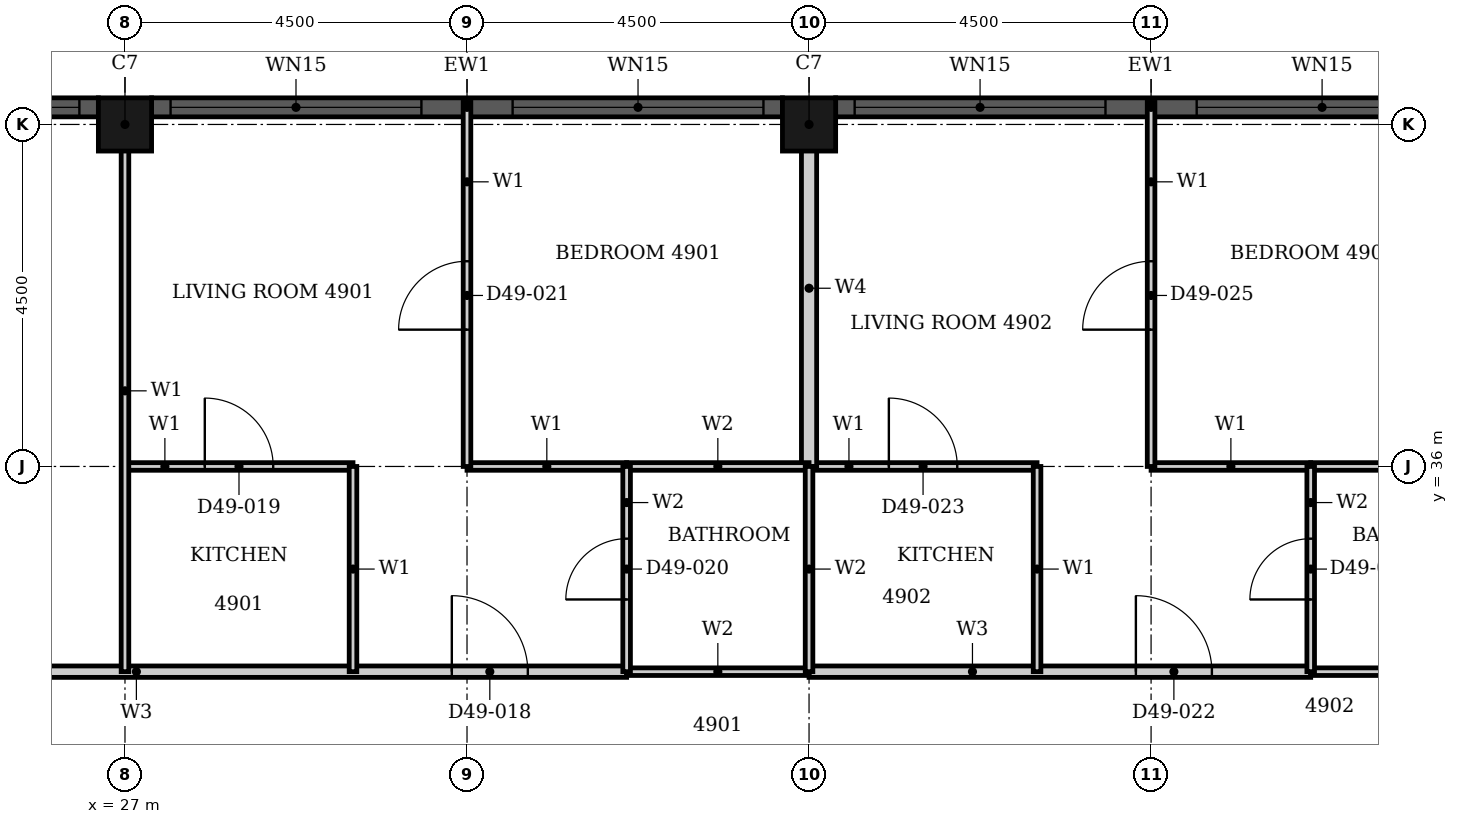
"""IFC4 building model, lengths in metres.
Left out: names, types, materials, properties, quantities, classifications, styles, units other than length and angle.
Written with IfcOpenShell. Run it as: python <this file> out.ifc"""

import sys

from ifc_helpers import new_model, si_unit, direction, frame, frame_2d, origin, origin_2d, place, context, subcontext, project, spatial, rectangle, hollow_rectangle, extrude, element, fill, save


model = new_model("IFC4")
c1 = context("Model", 3, precision=1e-05, world=origin(), true_north=direction((0.0, 1.0)))
c2 = subcontext(c1, "Body", "Model", "MODEL_VIEW")
j1 = project(units=[si_unit("LENGTHUNIT", "METRE"), si_unit("PLANEANGLEUNIT", "RADIAN")], contexts=[c1])
p1 = place(None, origin())
s1 = spatial("IfcSite", under=j1, at=p1, CompositionType="ELEMENT")
p2 = place(p1, origin())
s2 = spatial("IfcBuilding", under=s1, at=p2, CompositionType="ELEMENT")
p3 = place(p2, frame((0.0, 0.0, 196.1)))
s3 = spatial("IfcBuildingStorey", under=s2, at=p3, CompositionType="ELEMENT", Elevation=196.1)
for number, where, z_axis, x_axis in (
    (1, (36.0, 40.5, 0.0), (0.0, 0.0, 1.0), (1.0, 0.0, 0.0)),
    (2, (27.0, 40.5, 0.0), (0.0, 0.0, 1.0), (1.0, 0.0, 0.0)),
):
    element("IfcColumn", number, at=place(p3, frame(where, z_axis=z_axis, x_axis=x_axis)), inside=s3, PredefinedType="COLUMN", context=c2, shape_type="SweptSolid", body=[
        extrude(hollow_rectangle(XDim=0.7, YDim=0.7, WallThickness=0.022, at=origin_2d()), origin(), (0.0, 0.0, 1.0), 3.7),
    ])
p4 = place(p3, frame((44.65, 40.725, 0.0), z_axis=(0.0, 0.0, 1.0), x_axis=(-1.0, 0.0, 0.0)))
e3 = element("IfcWall", 3, at=p4, inside=s3, PredefinedType="SOLIDWALL", context=c2, shape_type="SweptSolid", body=[
    extrude(rectangle(XDim=8.3, YDim=0.25, at=frame_2d((4.15, 0.0))), origin(), (0.0, 0.0, 1.0), 3.7),
])
p5 = place(p4, frame((0.25, 0.0, 0.45)))
e4 = element("IfcOpeningElement", 4, at=p5, cuts=e3, PredefinedType="OPENING", context=c2, shape_type="SweptSolid", body=[
    extrude(rectangle(XDim=3.3, YDim=2.3, at=frame_2d((1.65, 1.15))), frame((0.0, 0.135, 0.0), z_axis=(0.0, -1.0, 0.0), x_axis=(1.0, 0.0, 0.0)), (0.0, 0.0, 1.0), 0.27),
])
p6 = place(p4, frame((4.75, 0.0, 0.45)))
e5 = element("IfcOpeningElement", 5, at=p6, cuts=e3, PredefinedType="OPENING", context=c2, shape_type="SweptSolid", body=[
    extrude(rectangle(XDim=3.3, YDim=2.3, at=frame_2d((1.65, 1.15))), frame((0.0, 0.135, 0.0), z_axis=(0.0, -1.0, 0.0), x_axis=(1.0, 0.0, 0.0)), (0.0, 0.0, 1.0), 0.27),
])
p7 = place(p3, frame((35.65, 40.725, 0.0), z_axis=(0.0, 0.0, 1.0), x_axis=(-1.0, 0.0, 0.0)))
e6 = element("IfcWall", 6, at=p7, inside=s3, PredefinedType="SOLIDWALL", context=c2, shape_type="SweptSolid", body=[
    extrude(rectangle(XDim=8.3, YDim=0.25, at=frame_2d((4.15, 0.0))), origin(), (0.0, 0.0, 1.0), 3.7),
])
p8 = place(p7, frame((0.25, 0.0, 0.45)))
e7 = element("IfcOpeningElement", 7, at=p8, cuts=e6, PredefinedType="OPENING", context=c2, shape_type="SweptSolid", body=[
    extrude(rectangle(XDim=3.3, YDim=2.3, at=frame_2d((1.65, 1.15))), frame((0.0, 0.135, 0.0), z_axis=(0.0, -1.0, 0.0), x_axis=(1.0, 0.0, 0.0)), (0.0, 0.0, 1.0), 0.27),
])
p9 = place(p7, frame((4.75, 0.0, 0.45)))
e8 = element("IfcOpeningElement", 8, at=p9, cuts=e6, PredefinedType="OPENING", context=c2, shape_type="SweptSolid", body=[
    extrude(rectangle(XDim=3.3, YDim=2.3, at=frame_2d((1.65, 1.15))), frame((0.0, 0.135, 0.0), z_axis=(0.0, -1.0, 0.0), x_axis=(1.0, 0.0, 0.0)), (0.0, 0.0, 1.0), 0.27),
])
p10 = place(p3, frame((26.65, 40.725, 0.0), z_axis=(0.0, 0.0, 1.0), x_axis=(-1.0, 0.0, 0.0)))
e9 = element("IfcWall", 9, at=p10, inside=s3, PredefinedType="SOLIDWALL", context=c2, shape_type="SweptSolid", body=[
    extrude(rectangle(XDim=8.3, YDim=0.25, at=frame_2d((4.15, 0.0))), origin(), (0.0, 0.0, 1.0), 3.7),
])
p11 = place(p10, frame((0.25, 0.0, 0.45)))
e10 = element("IfcOpeningElement", 10, at=p11, cuts=e9, PredefinedType="OPENING", context=c2, shape_type="SweptSolid", body=[
    extrude(rectangle(XDim=3.3, YDim=2.3, at=frame_2d((1.65, 1.15))), frame((0.0, 0.135, 0.0), z_axis=(0.0, -1.0, 0.0), x_axis=(1.0, 0.0, 0.0)), (0.0, 0.0, 1.0), 0.27),
])
p12 = place(p10, frame((4.75, 0.0, 0.45)))
e11 = element("IfcOpeningElement", 11, at=p12, cuts=e9, PredefinedType="OPENING", context=c2, shape_type="SweptSolid", body=[
    extrude(rectangle(XDim=3.3, YDim=2.3, at=frame_2d((1.65, 1.15))), frame((0.0, 0.135, 0.0), z_axis=(0.0, -1.0, 0.0), x_axis=(1.0, 0.0, 0.0)), (0.0, 0.0, 1.0), 0.27),
])
p13 = place(p3, frame((18.0, 33.3, 0.0), z_axis=(0.0, 0.0, 1.0), x_axis=(1.0, 0.0, 0.0)))
e12 = element("IfcWall", 12, at=p13, inside=s3, PredefinedType="PARTITIONING", context=c2, shape_type="SweptSolid", body=[
    extrude(rectangle(XDim=15.6, YDim=0.15, at=frame_2d((7.8, 0.0))), origin(), (0.0, 0.0, 1.0), 3.4),
])
p14 = place(p13, frame((4.0, 0.0, 0.0)))
e13 = element("IfcOpeningElement", 13, at=p14, cuts=e12, PredefinedType="OPENING", context=c2, shape_type="SweptSolid", body=[
    extrude(rectangle(XDim=1.0, YDim=2.1, at=frame_2d((0.5, 1.05))), frame((0.0, 0.085, 0.0), z_axis=(0.0, -1.0, 0.0), x_axis=(1.0, 0.0, 0.0)), (0.0, 0.0, 1.0), 0.17),
])
p15 = place(p13, frame((13.3, 0.0, 0.0)))
e14 = element("IfcOpeningElement", 14, at=p15, cuts=e12, PredefinedType="OPENING", context=c2, shape_type="SweptSolid", body=[
    extrude(rectangle(XDim=1.0, YDim=2.2, at=frame_2d((0.5, 1.1))), frame((0.0, 0.085, 0.0), z_axis=(0.0, -1.0, 0.0), x_axis=(1.0, 0.0, 0.0)), (0.0, 0.0, 1.0), 0.17),
])
p16 = place(p3, frame((36.0, 33.3, 0.0), z_axis=(0.0, 0.0, 1.0), x_axis=(1.0, 0.0, 0.0)))
e15 = element("IfcWall", 15, at=p16, inside=s3, PredefinedType="PARTITIONING", context=c2, shape_type="SweptSolid", body=[
    extrude(rectangle(XDim=6.6, YDim=0.15, at=frame_2d((3.3, 0.0))), origin(), (0.0, 0.0, 1.0), 3.4),
])
p17 = place(p16, frame((4.3, 0.0, 0.0)))
e16 = element("IfcOpeningElement", 16, at=p17, cuts=e15, PredefinedType="OPENING", context=c2, shape_type="SweptSolid", body=[
    extrude(rectangle(XDim=1.0, YDim=2.2, at=frame_2d((0.5, 1.1))), frame((0.0, 0.085, 0.0), z_axis=(0.0, -1.0, 0.0), x_axis=(1.0, 0.0, 0.0)), (0.0, 0.0, 1.0), 0.17),
])
p18 = place(p3, frame((31.5, 36.0, 0.0), z_axis=(0.0, 0.0, 1.0), x_axis=(1.0, 0.0, 0.0)))
e17 = element("IfcWall", 17, at=p18, inside=s3, PredefinedType="PARTITIONING", context=c2, shape_type="SweptSolid", body=[
    extrude(rectangle(XDim=2.1, YDim=0.1, at=frame_2d((1.05, 0.0))), origin(), (0.0, 0.0, 1.0), 3.4),
])
p19 = place(p3, frame((27.0, 36.0, 0.0), z_axis=(0.0, 0.0, 1.0), x_axis=(1.0, 0.0, 0.0)))
e18 = element("IfcWall", 18, at=p19, inside=s3, PredefinedType="PARTITIONING", context=c2, shape_type="SweptSolid", body=[
    extrude(rectangle(XDim=3.0, YDim=0.1, at=frame_2d((1.5, 0.0))), origin(), (0.0, 0.0, 1.0), 3.4),
])
p20 = place(p19, frame((1.05, 0.0, 0.0)))
e19 = element("IfcOpeningElement", 19, at=p20, cuts=e18, PredefinedType="OPENING", context=c2, shape_type="SweptSolid", body=[
    extrude(rectangle(XDim=0.9, YDim=2.1, at=frame_2d((0.45, 1.05))), frame((0.0, 0.06, 0.0), z_axis=(0.0, -1.0, 0.0), x_axis=(1.0, 0.0, 0.0)), (0.0, 0.0, 1.0), 0.12),
])
p21 = place(p3, frame((40.5, 36.0, 0.0), z_axis=(0.0, 0.0, 1.0), x_axis=(1.0, 0.0, 0.0)))
e20 = element("IfcWall", 20, at=p21, inside=s3, PredefinedType="PARTITIONING", context=c2, shape_type="SweptSolid", body=[
    extrude(rectangle(XDim=2.1, YDim=0.1, at=frame_2d((1.05, 0.0))), origin(), (0.0, 0.0, 1.0), 3.4),
])
p22 = place(p3, frame((36.0, 36.0, 0.0), z_axis=(0.0, 0.0, 1.0), x_axis=(1.0, 0.0, 0.0)))
e21 = element("IfcWall", 21, at=p22, inside=s3, PredefinedType="PARTITIONING", context=c2, shape_type="SweptSolid", body=[
    extrude(rectangle(XDim=3.0, YDim=0.1, at=frame_2d((1.5, 0.0))), origin(), (0.0, 0.0, 1.0), 3.4),
])
p23 = place(p22, frame((1.05, 0.0, 0.0)))
e22 = element("IfcOpeningElement", 22, at=p23, cuts=e21, PredefinedType="OPENING", context=c2, shape_type="SweptSolid", body=[
    extrude(rectangle(XDim=0.9, YDim=2.1, at=frame_2d((0.45, 1.05))), frame((0.0, 0.06, 0.0), z_axis=(0.0, -1.0, 0.0), x_axis=(1.0, 0.0, 0.0)), (0.0, 0.0, 1.0), 0.12),
])
p24 = place(p3, frame((27.0, 33.3, 0.0), z_axis=(0.0, 0.0, 1.0), x_axis=(0.0, 1.0, 0.0)))
e23 = element("IfcWall", 23, at=p24, inside=s3, PredefinedType="PARTITIONING", context=c2, shape_type="SweptSolid", body=[
    extrude(rectangle(XDim=7.39, YDim=0.1, at=frame_2d((3.695, 0.0))), origin(), (0.0, 0.0, 1.0), 3.4),
])
p25 = place(p3, frame((30.0, 33.3, 0.0), z_axis=(0.0, 0.0, 1.0), x_axis=(0.0, 1.0, 0.0)))
e24 = element("IfcWall", 24, at=p25, inside=s3, PredefinedType="PARTITIONING", context=c2, shape_type="SweptSolid", body=[
    extrude(rectangle(XDim=2.7, YDim=0.1, at=frame_2d((1.35, 0.0))), origin(), (0.0, 0.0, 1.0), 3.4),
])
p26 = place(p3, frame((31.5, 36.0, 0.0), z_axis=(0.0, 0.0, 1.0), x_axis=(0.0, 1.0, 0.0)))
e25 = element("IfcWall", 25, at=p26, inside=s3, PredefinedType="PARTITIONING", context=c2, shape_type="SweptSolid", body=[
    extrude(rectangle(XDim=4.79, YDim=0.1, at=frame_2d((2.395, 0.0))), origin(), (0.0, 0.0, 1.0), 3.4),
])
p27 = place(p26, frame((1.8, 0.0, 0.0)))
e26 = element("IfcOpeningElement", 26, at=p27, cuts=e25, PredefinedType="OPENING", context=c2, shape_type="SweptSolid", body=[
    extrude(rectangle(XDim=0.9, YDim=2.1, at=frame_2d((0.45, 1.05))), frame((0.0, 0.06, 0.0), z_axis=(0.0, -1.0, 0.0), x_axis=(1.0, 0.0, 0.0)), (0.0, 0.0, 1.0), 0.12),
])
p28 = place(p3, frame((39.0, 33.3, 0.0), z_axis=(0.0, 0.0, 1.0), x_axis=(0.0, 1.0, 0.0)))
e27 = element("IfcWall", 27, at=p28, inside=s3, PredefinedType="PARTITIONING", context=c2, shape_type="SweptSolid", body=[
    extrude(rectangle(XDim=2.7, YDim=0.1, at=frame_2d((1.35, 0.0))), origin(), (0.0, 0.0, 1.0), 3.4),
])
p29 = place(p3, frame((40.5, 36.0, 0.0), z_axis=(0.0, 0.0, 1.0), x_axis=(0.0, 1.0, 0.0)))
e28 = element("IfcWall", 28, at=p29, inside=s3, PredefinedType="PARTITIONING", context=c2, shape_type="SweptSolid", body=[
    extrude(rectangle(XDim=4.79, YDim=0.1, at=frame_2d((2.395, 0.0))), origin(), (0.0, 0.0, 1.0), 3.4),
])
p30 = place(p29, frame((1.8, 0.0, 0.0)))
e29 = element("IfcOpeningElement", 29, at=p30, cuts=e28, PredefinedType="OPENING", context=c2, shape_type="SweptSolid", body=[
    extrude(rectangle(XDim=0.9, YDim=2.1, at=frame_2d((0.45, 1.05))), frame((0.0, 0.06, 0.0), z_axis=(0.0, -1.0, 0.0), x_axis=(1.0, 0.0, 0.0)), (0.0, 0.0, 1.0), 0.12),
])
p31 = place(p3, frame((36.0, 36.0, 0.0), z_axis=(0.0, 0.0, 1.0), x_axis=(0.0, 1.0, 0.0)))
e30 = element("IfcWall", 30, at=p31, inside=s3, PredefinedType="PARTITIONING", context=c2, shape_type="SweptSolid", body=[
    extrude(rectangle(XDim=4.69, YDim=0.2, at=frame_2d((2.345, 0.0))), origin(), (0.0, 0.0, 1.0), 3.4),
])
for number, where, z_axis, x_axis in (
    (31, (33.6, 33.3, 0.0), (0.0, 0.0, 1.0), (1.0, 0.0, 0.0)),
    (32, (42.6, 33.3, 0.0), (0.0, 0.0, 1.0), (1.0, 0.0, 0.0)),
    (33, (33.6, 36.0, 0.0), (0.0, 0.0, 1.0), (1.0, 0.0, 0.0)),
    (34, (42.6, 36.0, 0.0), (0.0, 0.0, 1.0), (1.0, 0.0, 0.0)),
):
    element("IfcWall", number, at=place(p3, frame(where, z_axis=z_axis, x_axis=x_axis)), inside=s3, PredefinedType="PARTITIONING", context=c2, shape_type="SweptSolid", body=[
        extrude(rectangle(XDim=2.4, YDim=0.1, at=frame_2d((1.2, 0.0))), origin(), (0.0, 0.0, 1.0), 3.4),
    ])
p32 = place(p3, frame((33.6, 33.3, 0.0), z_axis=(0.0, 0.0, 1.0), x_axis=(0.0, 1.0, 0.0)))
e35 = element("IfcWall", 35, at=p32, inside=s3, PredefinedType="PARTITIONING", context=c2, shape_type="SweptSolid", body=[
    extrude(rectangle(XDim=2.7, YDim=0.1, at=frame_2d((1.35, 0.0))), origin(), (0.0, 0.0, 1.0), 3.4),
])
p33 = place(p32, frame((0.95, 0.0, 0.0)))
e36 = element("IfcOpeningElement", 36, at=p33, cuts=e35, PredefinedType="OPENING", context=c2, shape_type="SweptSolid", body=[
    extrude(rectangle(XDim=0.8, YDim=2.1, at=frame_2d((0.4, 1.05))), frame((0.0, 0.06, 0.0), z_axis=(0.0, -1.0, 0.0), x_axis=(1.0, 0.0, 0.0)), (0.0, 0.0, 1.0), 0.12),
])
p34 = place(p3, frame((36.0, 33.3, 0.0), z_axis=(0.0, 0.0, 1.0), x_axis=(0.0, 1.0, 0.0)))
e37 = element("IfcWall", 37, at=p34, inside=s3, PredefinedType="PARTITIONING", context=c2, shape_type="SweptSolid", body=[
    extrude(rectangle(XDim=2.7, YDim=0.1, at=frame_2d((1.35, 0.0))), origin(), (0.0, 0.0, 1.0), 3.4),
])
p35 = place(p3, frame((42.6, 33.3, 0.0), z_axis=(0.0, 0.0, 1.0), x_axis=(0.0, 1.0, 0.0)))
e38 = element("IfcWall", 38, at=p35, inside=s3, PredefinedType="PARTITIONING", context=c2, shape_type="SweptSolid", body=[
    extrude(rectangle(XDim=2.7, YDim=0.1, at=frame_2d((1.35, 0.0))), origin(), (0.0, 0.0, 1.0), 3.4),
])
p36 = place(p35, frame((0.95, 0.0, 0.0)))
e39 = element("IfcOpeningElement", 39, at=p36, cuts=e38, PredefinedType="OPENING", context=c2, shape_type="SweptSolid", body=[
    extrude(rectangle(XDim=0.8, YDim=2.1, at=frame_2d((0.4, 1.05))), frame((0.0, 0.06, 0.0), z_axis=(0.0, -1.0, 0.0), x_axis=(1.0, 0.0, 0.0)), (0.0, 0.0, 1.0), 0.12),
])
p37 = place(p5, origin())
e40 = element("IfcWindow", 40, at=p37, inside=s3, PartitioningType="SINGLE_PANEL", PredefinedType="WINDOW", context=c2, shape_type="SweptSolid", body=[
    extrude(rectangle(XDim=3.3, YDim=2.3, at=frame_2d((1.65, 1.15))), frame((0.0, 0.03, 0.0), z_axis=(0.0, -1.0, 0.0), x_axis=(1.0, 0.0, 0.0)), (0.0, 0.0, 1.0), 0.06),
])
fill(e4, e40)
p38 = place(p6, origin())
e41 = element("IfcWindow", 41, at=p38, inside=s3, PartitioningType="SINGLE_PANEL", PredefinedType="WINDOW", context=c2, shape_type="SweptSolid", body=[
    extrude(rectangle(XDim=3.3, YDim=2.3, at=frame_2d((1.65, 1.15))), frame((0.0, 0.03, 0.0), z_axis=(0.0, -1.0, 0.0), x_axis=(1.0, 0.0, 0.0)), (0.0, 0.0, 1.0), 0.06),
])
fill(e5, e41)
p39 = place(p8, origin())
e42 = element("IfcWindow", 42, at=p39, inside=s3, PartitioningType="SINGLE_PANEL", PredefinedType="WINDOW", context=c2, shape_type="SweptSolid", body=[
    extrude(rectangle(XDim=3.3, YDim=2.3, at=frame_2d((1.65, 1.15))), frame((0.0, 0.03, 0.0), z_axis=(0.0, -1.0, 0.0), x_axis=(1.0, 0.0, 0.0)), (0.0, 0.0, 1.0), 0.06),
])
fill(e7, e42)
p40 = place(p9, origin())
e43 = element("IfcWindow", 43, at=p40, inside=s3, PartitioningType="SINGLE_PANEL", PredefinedType="WINDOW", context=c2, shape_type="SweptSolid", body=[
    extrude(rectangle(XDim=3.3, YDim=2.3, at=frame_2d((1.65, 1.15))), frame((0.0, 0.03, 0.0), z_axis=(0.0, -1.0, 0.0), x_axis=(1.0, 0.0, 0.0)), (0.0, 0.0, 1.0), 0.06),
])
fill(e8, e43)
p41 = place(p11, origin())
e44 = element("IfcWindow", 44, at=p41, inside=s3, PartitioningType="SINGLE_PANEL", PredefinedType="WINDOW", context=c2, shape_type="SweptSolid", body=[
    extrude(rectangle(XDim=3.3, YDim=2.3, at=frame_2d((1.65, 1.15))), frame((0.0, 0.03, 0.0), z_axis=(0.0, -1.0, 0.0), x_axis=(1.0, 0.0, 0.0)), (0.0, 0.0, 1.0), 0.06),
])
fill(e10, e44)
p42 = place(p15, origin())
e45 = element("IfcDoor", 45, at=p42, inside=s3, OperationType="SINGLE_SWING_RIGHT", PredefinedType="DOOR", context=c2, shape_type="SweptSolid", body=[
    extrude(rectangle(XDim=1.0, YDim=2.2, at=frame_2d((0.5, 1.1))), frame((0.0, 0.025, 0.0), z_axis=(0.0, -1.0, 0.0), x_axis=(1.0, 0.0, 0.0)), (0.0, 0.0, 1.0), 0.05),
])
fill(e14, e45)
p43 = place(p20, origin())
e46 = element("IfcDoor", 46, at=p43, inside=s3, OperationType="SINGLE_SWING_LEFT", PredefinedType="DOOR", context=c2, shape_type="SweptSolid", body=[
    extrude(rectangle(XDim=0.9, YDim=2.1, at=frame_2d((0.45, 1.05))), frame((0.0, 0.025, 0.0), z_axis=(0.0, -1.0, 0.0), x_axis=(1.0, 0.0, 0.0)), (0.0, 0.0, 1.0), 0.05),
])
fill(e19, e46)
p44 = place(p33, origin())
e47 = element("IfcDoor", 47, at=p44, inside=s3, OperationType="SINGLE_SWING_LEFT", PredefinedType="DOOR", context=c2, shape_type="SweptSolid", body=[
    extrude(rectangle(XDim=0.8, YDim=2.1, at=frame_2d((0.4, 1.05))), frame((0.0, 0.025, 0.0), z_axis=(0.0, -1.0, 0.0), x_axis=(1.0, 0.0, 0.0)), (0.0, 0.0, 1.0), 0.05),
])
fill(e36, e47)
p45 = place(p27, origin())
e48 = element("IfcDoor", 48, at=p45, inside=s3, OperationType="SINGLE_SWING_LEFT", PredefinedType="DOOR", context=c2, shape_type="SweptSolid", body=[
    extrude(rectangle(XDim=0.9, YDim=2.1, at=frame_2d((0.45, 1.05))), frame((0.0, 0.025, 0.0), z_axis=(0.0, -1.0, 0.0), x_axis=(1.0, 0.0, 0.0)), (0.0, 0.0, 1.0), 0.05),
])
fill(e26, e48)
p46 = place(p17, origin())
e49 = element("IfcDoor", 49, at=p46, inside=s3, OperationType="SINGLE_SWING_LEFT", PredefinedType="DOOR", context=c2, shape_type="SweptSolid", body=[
    extrude(rectangle(XDim=1.0, YDim=2.2, at=frame_2d((0.5, 1.1))), frame((0.0, 0.025, 0.0), z_axis=(0.0, -1.0, 0.0), x_axis=(1.0, 0.0, 0.0)), (0.0, 0.0, 1.0), 0.05),
])
fill(e16, e49)
p47 = place(p23, origin())
e50 = element("IfcDoor", 50, at=p47, inside=s3, OperationType="SINGLE_SWING_LEFT", PredefinedType="DOOR", context=c2, shape_type="SweptSolid", body=[
    extrude(rectangle(XDim=0.9, YDim=2.1, at=frame_2d((0.45, 1.05))), frame((0.0, 0.025, 0.0), z_axis=(0.0, -1.0, 0.0), x_axis=(1.0, 0.0, 0.0)), (0.0, 0.0, 1.0), 0.05),
])
fill(e22, e50)
p48 = place(p36, origin())
e51 = element("IfcDoor", 51, at=p48, inside=s3, OperationType="SINGLE_SWING_RIGHT", PredefinedType="DOOR", context=c2, shape_type="SweptSolid", body=[
    extrude(rectangle(XDim=0.8, YDim=2.1, at=frame_2d((0.4, 1.05))), frame((0.0, 0.025, 0.0), z_axis=(0.0, -1.0, 0.0), x_axis=(1.0, 0.0, 0.0)), (0.0, 0.0, 1.0), 0.05),
])
fill(e39, e51)
p49 = place(p30, origin())
e52 = element("IfcDoor", 52, at=p49, inside=s3, OperationType="SINGLE_SWING_RIGHT", PredefinedType="DOOR", context=c2, shape_type="SweptSolid", body=[
    extrude(rectangle(XDim=0.9, YDim=2.1, at=frame_2d((0.45, 1.05))), frame((0.0, 0.025, 0.0), z_axis=(0.0, -1.0, 0.0), x_axis=(1.0, 0.0, 0.0)), (0.0, 0.0, 1.0), 0.05),
])
fill(e29, e52)
save(model, sys.argv[1])
